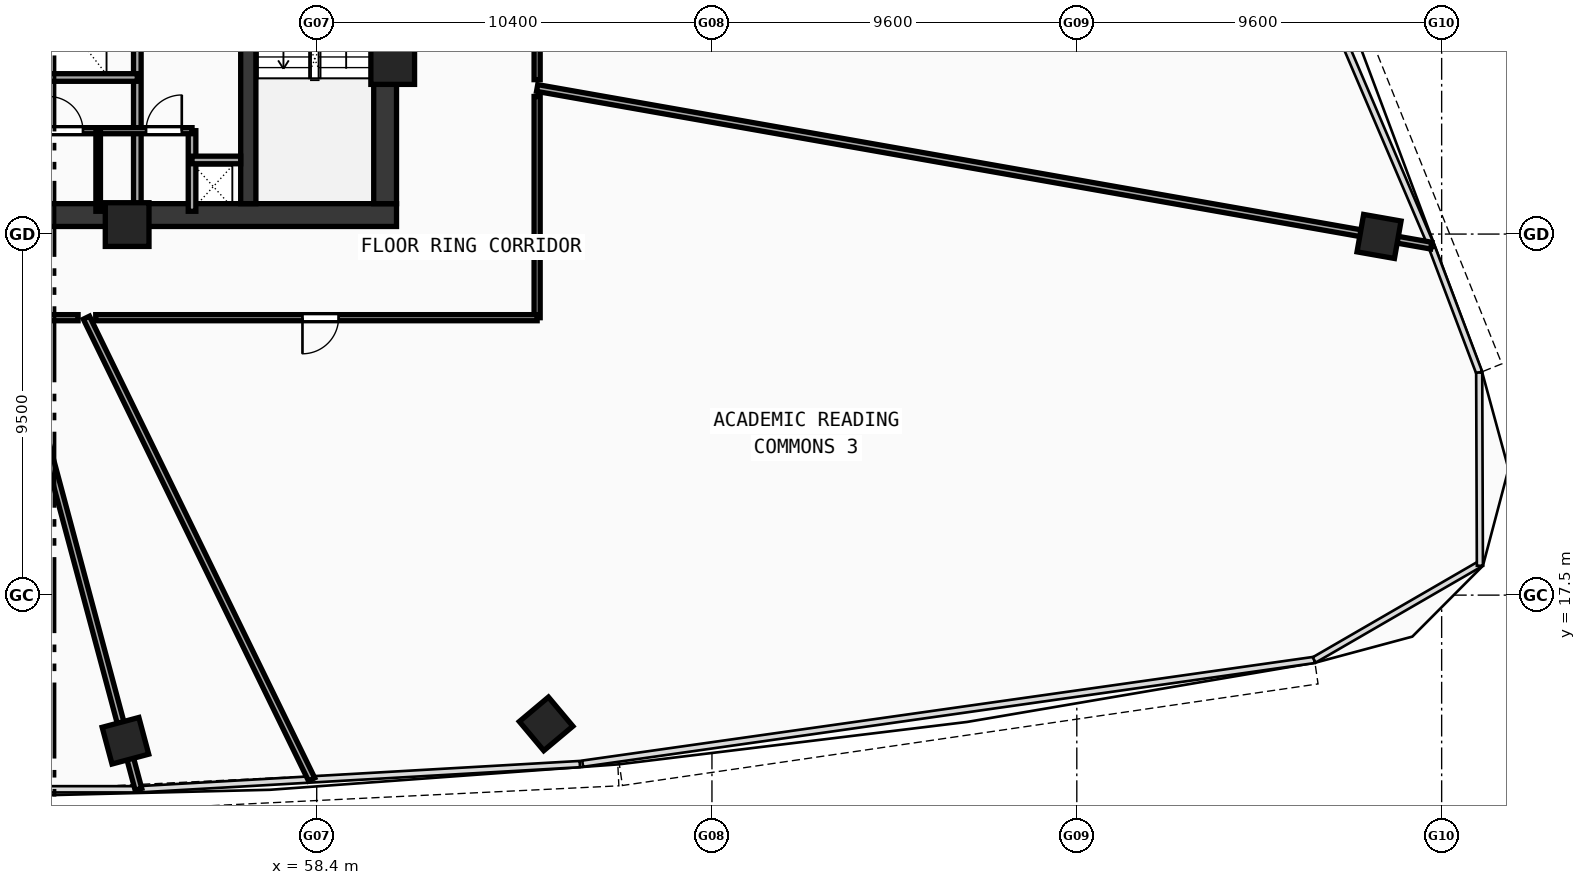
"""IFC4 building model, lengths in metres.
Left out: names, types, materials, properties, quantities, classifications, styles, units other than length and angle.
Written with IfcOpenShell. Run it as: python <this file> out.ifc"""

import sys

from ifc_helpers import new_model, si_unit, direction, frame, frame_2d, origin, origin_with_axes, origin_2d, place, context, subcontext, project, spatial, rectangle, hollow_rectangle, extrude, source, transform, mapped, element, fill, save


model = new_model("IFC4")
c1 = context("Model", 3, precision=1e-05, world=origin(), true_north=direction((0.0, 1.0)))
c2 = subcontext(c1, "Body", "Model", "MODEL_VIEW")
j1 = project(units=[si_unit("LENGTHUNIT", "METRE"), si_unit("PLANEANGLEUNIT", "RADIAN")], contexts=[c1])
p1 = place(None, origin())
s1 = spatial("IfcSite", under=j1, at=p1, CompositionType="ELEMENT")
p2 = place(p1, origin())
s2 = spatial("IfcBuilding", under=s1, at=p2, CompositionType="ELEMENT")
p3 = place(p2, frame((0.0, 0.0, 115.38)))
s3 = spatial("IfcBuildingStorey", under=s2, at=p3, CompositionType="ELEMENT", Elevation=115.38)
p4 = place(p3, frame((35.5, 27.5, 0.0), z_axis=(0.0, 0.0, 1.0), x_axis=(1.0, 0.0, 0.0)))
e1 = element("IfcWall", 1, at=p4, inside=s3, PredefinedType="SHEAR", context=c2, shape_type="SweptSolid", body=[
    extrude(rectangle(XDim=25.0, YDim=0.6, at=frame_2d((12.5, 0.0))), origin(), (0.0, 0.0, 1.0), 3.52),
])
p5 = place(p3, frame((60.2, 27.8, 0.0), z_axis=(0.0, 0.0, 1.0), x_axis=(0.0, 1.0, 0.0)))
e2 = element("IfcWall", 2, at=p5, inside=s3, PredefinedType="SHEAR", context=c2, shape_type="SweptSolid", body=[
    extrude(rectangle(XDim=12.1, YDim=0.6, at=frame_2d((6.05, 0.0))), origin(), (0.0, 0.0, 1.0), 3.52),
])
p6 = place(p3, frame((56.6, 27.8, 0.0), z_axis=(0.0, 0.0, 1.0), x_axis=(0.0, 1.0, 0.0)))
e3 = element("IfcWall", 3, at=p6, inside=s3, PredefinedType="SHEAR", context=c2, shape_type="SweptSolid", body=[
    extrude(rectangle(XDim=12.1, YDim=0.4, at=frame_2d((6.05, 0.0))), origin(), (0.0, 0.0, 1.0), 3.52),
])
p7 = place(p6, frame((9.95, 0.0, 0.0)))
e4 = element("IfcOpeningElement", 4, at=p7, cuts=e3, PredefinedType="OPENING", context=c2, shape_type="SweptSolid", body=[
    extrude(rectangle(XDim=1.1, YDim=2.1, at=frame_2d((0.55, 1.05))), frame((0.0, 0.21, 0.0), z_axis=(0.0, -1.0, 0.0), x_axis=(1.0, 0.0, 0.0)), (0.0, 0.0, 1.0), 0.42),
])
m1 = source(origin(), c2, "Body", "SweptSolid", [
    extrude(hollow_rectangle(XDim=1.15, YDim=1.15, WallThickness=0.048, at=origin_2d()), origin(), (0.0, 0.0, 1.0), 3.78),
])
for number, where, z_axis, x_axis in (
    (5, (53.412, 27.25, -0.26), (0.0, 0.0, 1.0), (1.0, 0.0, 0.0)),
    (6, (60.4, 31.513, -0.26), (0.0, 0.0, 1.0), (1.0, 0.0, 0.0)),
):
    element("IfcColumn", number, at=place(p3, frame(where, z_axis=z_axis, x_axis=x_axis)), inside=s3, PredefinedType="COLUMN", context=c2, shape_type="MappedRepresentation", body=[
        mapped(m1, transform((0.0, 0.0, 0.0), scale=1.0)),
    ])
m2 = source(origin(), c2, "Body", "SweptSolid", [
    extrude(hollow_rectangle(XDim=1.0, YDim=1.0, WallThickness=0.042, at=origin_2d()), origin(), (0.0, 0.0, 1.0), 3.78),
])
for number, where, z_axis, x_axis in (
    (7, (53.367, 13.668, -0.26), (0.0, 0.0, 1.0), (0.966, 0.259, 0.0)),
    (8, (64.436, 14.112, -0.26), (0.0, 0.0, 1.0), (0.766, 0.643, 0.0)),
    (9, (86.353, 26.938, -0.26), (0.0, 0.0, 1.0), (0.174, 0.985, 0.0)),
):
    element("IfcColumn", number, at=place(p3, frame(where, z_axis=z_axis, x_axis=x_axis)), inside=s3, PredefinedType="COLUMN", context=c2, shape_type="MappedRepresentation", body=[
        mapped(m2, transform((0.0, 0.0, 0.0), scale=1.0)),
    ])
p8 = place(p3, frame((53.68, 27.6, 0.0), z_axis=(0.0, 0.0, 1.0), x_axis=(0.0, 1.0, 0.0)))
e10 = element("IfcWall", 10, at=p8, inside=s3, PredefinedType="SOLIDWALL", context=c2, shape_type="SweptSolid", body=[
    extrude(rectangle(XDim=9.05, YDim=0.2, at=frame_2d((4.525, 0.0))), origin(), (0.0, 0.0, 1.0), 3.52),
])
p9 = place(p8, frame((6.9, 0.0, 0.0)))
e11 = element("IfcOpeningElement", 11, at=p9, cuts=e10, PredefinedType="OPENING", context=c2, shape_type="SweptSolid", body=[
    extrude(rectangle(XDim=1.05, YDim=2.1, at=frame_2d((0.525, 1.05))), frame((0.0, 0.11, 0.0), z_axis=(0.0, -1.0, 0.0), x_axis=(1.0, 0.0, 0.0)), (0.0, 0.0, 1.0), 0.22),
])
p10 = place(p3, frame((43.85, 31.12, 0.0), z_axis=(0.0, 0.0, 1.0), x_axis=(1.0, 0.0, 0.0)))
e12 = element("IfcWall", 12, at=p10, inside=s3, PredefinedType="SOLIDWALL", context=c2, shape_type="SweptSolid", body=[
    extrude(rectangle(XDim=9.83, YDim=0.2, at=frame_2d((4.915, 0.0))), origin(), (0.0, 0.0, 1.0), 3.52),
])
p11 = place(p3, frame((55.12, 27.6, 0.0), z_axis=(0.0, 0.0, 1.0), x_axis=(0.0, 1.0, 0.0)))
e13 = element("IfcWall", 13, at=p11, inside=s3, PredefinedType="SOLIDWALL", context=c2, shape_type="SweptSolid", body=[
    extrude(rectangle(XDim=2.12, YDim=0.2, at=frame_2d((1.06, 0.0))), origin(), (0.0, 0.0, 1.0), 3.52),
])
p12 = place(p3, frame((55.12, 28.95, 0.0), z_axis=(0.0, 0.0, 1.0), x_axis=(1.0, 0.0, 0.0)))
e14 = element("IfcWall", 14, at=p12, inside=s3, PredefinedType="SOLIDWALL", context=c2, shape_type="SweptSolid", body=[
    extrude(rectangle(XDim=1.28, YDim=0.2, at=frame_2d((0.64, 0.0))), origin(), (0.0, 0.0, 1.0), 3.52),
])
p13 = place(p3, frame((51.05, 29.72, 0.0), z_axis=(0.0, 0.0, 1.0), x_axis=(1.0, 0.0, 0.0)))
e15 = element("IfcWall", 15, at=p13, inside=s3, PredefinedType="PARTITIONING", context=c2, shape_type="SweptSolid", body=[
    extrude(rectangle(XDim=4.07, YDim=0.16, at=frame_2d((2.035, 0.0))), origin(), (0.0, 0.0, 1.0), 3.52),
])
p14 = place(p13, frame((0.3, 0.0, 0.0)))
e16 = element("IfcOpeningElement", 16, at=p14, cuts=e15, PredefinedType="OPENING", context=c2, shape_type="SweptSolid", body=[
    extrude(rectangle(XDim=0.9, YDim=2.1, at=frame_2d((0.45, 1.05))), frame((0.0, 0.09, 0.0), z_axis=(0.0, -1.0, 0.0), x_axis=(1.0, 0.0, 0.0)), (0.0, 0.0, 1.0), 0.18),
])
p15 = place(p13, frame((2.86, 0.0, 0.0)))
e17 = element("IfcOpeningElement", 17, at=p15, cuts=e15, PredefinedType="OPENING", context=c2, shape_type="SweptSolid", body=[
    extrude(rectangle(XDim=0.94, YDim=2.1, at=frame_2d((0.47, 1.05))), frame((0.0, 0.09, 0.0), z_axis=(0.0, -1.0, 0.0), x_axis=(1.0, 0.0, 0.0)), (0.0, 0.0, 1.0), 0.18),
])
p16 = place(p3, frame((52.65, 27.6, 0.0), z_axis=(0.0, 0.0, 1.0), x_axis=(0.0, 1.0, 0.0)))
e18 = element("IfcWall", 18, at=p16, inside=s3, PredefinedType="PARTITIONING", context=c2, shape_type="SweptSolid", body=[
    extrude(rectangle(XDim=2.12, YDim=0.12, at=frame_2d((1.06, 0.0))), origin(), (0.0, 0.0, 1.0), 3.52),
])
p17 = place(p3, frame((50.385, 24.8, 0.0), z_axis=(0.0, 0.0, 1.0), x_axis=(0.258818094647, -0.965926080962, 0.0)))
e19 = element("IfcWall", 19, at=p17, inside=s3, PredefinedType="PARTITIONING", context=c2, shape_type="SweptSolid", body=[
    extrude(rectangle(XDim=12.847, YDim=0.18, at=frame_2d((6.423, 0.0))), origin(), (0.0, 0.0, 1.0), 2.82),
])
p18 = place(p3, frame((52.341, 24.8, 0.0), z_axis=(0.0, 0.0, 1.0), x_axis=(0.438370251769, -0.898794482829, 0.0)))
e20 = element("IfcWall", 20, at=p18, inside=s3, PredefinedType="PARTITIONING", context=c2, shape_type="SweptSolid", body=[
    extrude(rectangle(XDim=13.517, YDim=0.18, at=frame_2d((6.758, 0.0))), origin(), (0.0, 0.0, 1.0), 2.82),
])
p19 = place(p3, frame((64.2, 30.844, 0.0), z_axis=(0.0, 0.0, 1.0), x_axis=(0.98480783024, -0.173647739683, 0.0)))
e21 = element("IfcWall", 21, at=p19, inside=s3, PredefinedType="PARTITIONING", context=c2, shape_type="SweptSolid", body=[
    extrude(rectangle(XDim=23.889, YDim=0.18, at=frame_2d((11.944, 0.0))), origin(), (0.0, 0.0, 1.0), 2.82),
])
p20 = place(p3, frame((64.2, 38.744, 0.0), z_axis=(0.0, 0.0, 1.0), x_axis=(0.0, -1.0, 0.0)))
e22 = element("IfcWall", 22, at=p20, inside=s3, PredefinedType="PARTITIONING", context=c2, shape_type="SweptSolid", body=[
    extrude(rectangle(XDim=7.681, YDim=0.16, at=frame_2d((3.84, 0.0))), origin(), (0.0, 0.0, 1.0), 3.52),
])
p21 = place(p20, frame((3.38, 0.0, 0.0)))
e23 = element("IfcOpeningElement", 23, at=p21, cuts=e22, PredefinedType="OPENING", context=c2, shape_type="SweptSolid", body=[
    extrude(rectangle(XDim=0.92, YDim=2.1, at=frame_2d((0.46, 1.05))), frame((0.0, 0.09, 0.0), z_axis=(0.0, -1.0, 0.0), x_axis=(1.0, 0.0, 0.0)), (0.0, 0.0, 1.0), 0.18),
])
p22 = place(p3, frame((64.2, 30.62, 0.0), z_axis=(0.0, 0.0, 1.0), x_axis=(0.0, -1.0, 0.0)))
e24 = element("IfcWall", 24, at=p22, inside=s3, PredefinedType="PARTITIONING", context=c2, shape_type="SweptSolid", body=[
    extrude(rectangle(XDim=5.82, YDim=0.16, at=frame_2d((2.91, 0.0))), origin(), (0.0, 0.0, 1.0), 3.12),
])
p23 = place(p3, frame((64.2, 24.8, 0.0), z_axis=(0.0, 0.0, 1.0), x_axis=(-1.0, 0.0, 0.0)))
e25 = element("IfcWall", 25, at=p23, inside=s3, PredefinedType="PARTITIONING", context=c2, shape_type="SweptSolid", body=[
    extrude(rectangle(XDim=11.614, YDim=0.16, at=frame_2d((5.807, 0.0))), origin(), (0.0, 0.0, 1.0), 2.82),
])
p24 = place(p23, frame((5.225, 0.0, 0.0)))
e26 = element("IfcOpeningElement", 26, at=p24, cuts=e25, PredefinedType="OPENING", context=c2, shape_type="SweptSolid", body=[
    extrude(rectangle(XDim=0.95, YDim=2.1, at=frame_2d((0.475, 1.05))), frame((0.0, 0.09, 0.0), z_axis=(0.0, -1.0, 0.0), x_axis=(1.0, 0.0, 0.0)), (0.0, 0.0, 1.0), 0.18),
])
p25 = place(p3, frame((52.121, 24.8, 0.0), z_axis=(0.0, 0.0, 1.0), x_axis=(-1.0, 0.0, 0.0)))
e27 = element("IfcWall", 27, at=p25, inside=s3, PredefinedType="PARTITIONING", context=c2, shape_type="SweptSolid", body=[
    extrude(rectangle(XDim=1.509, YDim=0.16, at=frame_2d((0.754, 0.0))), origin(), (0.0, 0.0, 1.0), 3.52),
])
m3 = source(origin(), c2, "Body", "SweptSolid", [
    extrude(rectangle(XDim=0.9, YDim=2.1, at=frame_2d((0.45, 1.05))), frame((0.0, 0.025, 0.0), z_axis=(0.0, -1.0, 0.0), x_axis=(1.0, 0.0, 0.0)), (0.0, 0.0, 1.0), 0.05),
])
p26 = place(p14, origin_with_axes())
e28 = element("IfcDoor", 28, at=p26, inside=s3, OperationType="SINGLE_SWING_LEFT", PredefinedType="DOOR", context=c2, shape_type="MappedRepresentation", body=[
    mapped(m3, transform((0.0, 0.0, 0.0), scale=1.0)),
])
fill(e16, e28)
m4 = source(origin(), c2, "Body", "SweptSolid", [
    extrude(rectangle(XDim=0.94, YDim=2.1, at=frame_2d((0.47, 1.05))), frame((0.0, 0.025, 0.0), z_axis=(0.0, -1.0, 0.0), x_axis=(1.0, 0.0, 0.0)), (0.0, 0.0, 1.0), 0.05),
])
p27 = place(p15, origin_with_axes())
e29 = element("IfcDoor", 29, at=p27, inside=s3, OperationType="SINGLE_SWING_RIGHT", PredefinedType="DOOR", context=c2, shape_type="MappedRepresentation", body=[
    mapped(m4, transform((0.0, 0.0, 0.0), scale=1.0)),
])
fill(e17, e29)
m5 = source(origin(), c2, "Body", "SweptSolid", [
    extrude(rectangle(XDim=0.95, YDim=2.1, at=frame_2d((0.475, 1.05))), frame((0.0, 0.025, 0.0), z_axis=(0.0, -1.0, 0.0), x_axis=(1.0, 0.0, 0.0)), (0.0, 0.0, 1.0), 0.05),
])
p28 = place(p24, origin_with_axes())
e30 = element("IfcDoor", 30, at=p28, inside=s3, OperationType="SINGLE_SWING_RIGHT", PredefinedType="DOOR", context=c2, shape_type="MappedRepresentation", body=[
    mapped(m5, transform((0.0, 0.0, 0.0), scale=1.0)),
])
fill(e26, e30)
save(model, sys.argv[1])
